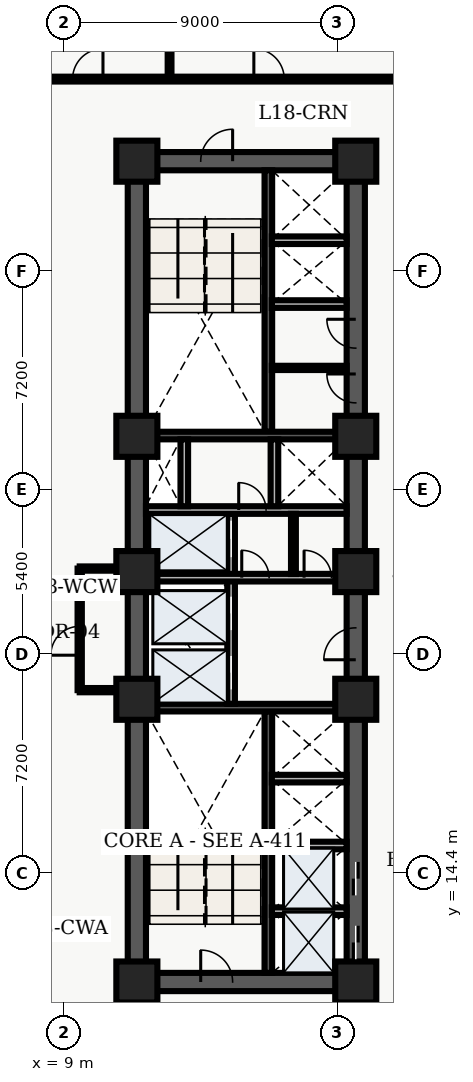
"""IFC4 building model, lengths in metres.
Left out: names, types, materials, properties, quantities, classifications, styles, units other than length and angle.
Written with IfcOpenShell. Run it as: python <this file> out.ifc"""

import sys

from ifc_helpers import new_model, entity, si_unit, converted_unit, direction, frame, origin_with_axes, origin_2d_with_axis, place, context, subcontext, project, spatial, polyline, rectangle, outline, extrude, element, fill, save


model = new_model("IFC4")
c1 = context("Model", 3, precision=1e-05, world=origin_with_axes(), true_north=direction((0.0, 1.0)))
c2 = subcontext(c1, "Body", "Model", "MODEL_VIEW")
j1 = project(units=[si_unit("LENGTHUNIT", "METRE"), converted_unit("PLANEANGLEUNIT", "DEGREE", entity("IfcPlaneAngleMeasure", 0.017), si_unit("PLANEANGLEUNIT", "RADIAN"), dimensions=[0, 0, 0, 0, 0, 0, 0])], contexts=[c1])
p1 = place(None, origin_with_axes())
s1 = spatial("IfcSite", under=j1, at=p1, CompositionType="ELEMENT")
p2 = place(p1, origin_with_axes())
s2 = spatial("IfcBuilding", under=s1, at=p2, CompositionType="ELEMENT")
p3 = place(p2, frame((0.0, 0.0, 75.6), z_axis=(0.0, 0.0, 1.0), x_axis=(1.0, 0.0, 0.0)))
s3 = spatial("IfcBuildingStorey", under=s2, at=p3, CompositionType="ELEMENT", Elevation=75.6)
p4 = place(p3, frame((11.4, 10.8, 0.0), z_axis=(0.0, 0.0, 1.0), x_axis=(0.0, 1.0, 0.0)))
e1 = element("IfcWall", 1, at=p4, inside=s3, PredefinedType="SHEAR", context=c2, shape_type="SweptSolid", body=[
    extrude(outline(polyline([(0.0, -0.3), (27.0, -0.3), (27.0, 0.3), (0.0, 0.3), (0.0, -0.3)])), origin_with_axes(), (0.0, 0.0, 1.0), 3.6),
])
p5 = place(p3, frame((11.4, 10.8, 0.0), z_axis=(0.0, 0.0, 1.0), x_axis=(1.0, 0.0, 0.0)))
e2 = element("IfcWall", 2, at=p5, inside=s3, PredefinedType="SHEAR", context=c2, shape_type="SweptSolid", body=[
    extrude(outline(polyline([(0.0, -0.3), (7.2, -0.3), (7.2, 0.3), (0.0, 0.3), (0.0, -0.3)])), origin_with_axes(), (0.0, 0.0, 1.0), 3.6),
])
p6 = place(p5, frame((2.625, 0.0, 0.0), z_axis=(0.0, 0.0, 1.0), x_axis=(1.0, 0.0, 0.0)))
e3 = element("IfcOpeningElement", 3, at=p6, cuts=e2, PredefinedType="OPENING", context=c2, shape_type="SweptSolid", body=[
    extrude(rectangle(XDim=1.05, YDim=0.62, at=origin_2d_with_axis()), origin_with_axes(), (0.0, 0.0, 1.0), 2.15),
])
p7 = place(p3, frame((11.4, 37.8, 0.0), z_axis=(0.0, 0.0, 1.0), x_axis=(1.0, 0.0, 0.0)))
e4 = element("IfcWall", 4, at=p7, inside=s3, PredefinedType="SHEAR", context=c2, shape_type="SweptSolid", body=[
    extrude(outline(polyline([(0.0, -0.3), (7.2, -0.3), (7.2, 0.3), (0.0, 0.3), (0.0, -0.3)])), origin_with_axes(), (0.0, 0.0, 1.0), 3.6),
])
p8 = place(p7, frame((2.625, 0.0, 0.0), z_axis=(0.0, 0.0, 1.0), x_axis=(1.0, 0.0, 0.0)))
e5 = element("IfcOpeningElement", 5, at=p8, cuts=e4, PredefinedType="OPENING", context=c2, shape_type="SweptSolid", body=[
    extrude(rectangle(XDim=1.05, YDim=0.62, at=origin_2d_with_axis()), origin_with_axes(), (0.0, 0.0, 1.0), 2.15),
])
p9 = place(p3, frame((18.6, 10.8, 0.0), z_axis=(0.0, 0.0, 1.0), x_axis=(0.0, 1.0, 0.0)))
e6 = element("IfcWall", 6, at=p9, inside=s3, PredefinedType="SHEAR", context=c2, shape_type="SweptSolid", body=[
    extrude(outline(polyline([(0.0, -0.3), (13.5, -0.3), (13.5, 0.3), (0.0, 0.3), (0.0, -0.3)])), origin_with_axes(), (0.0, 0.0, 1.0), 3.6),
])
p10 = place(p9, frame((1.3, 0.0, 0.0), z_axis=(0.0, 0.0, 1.0), x_axis=(1.0, 0.0, 0.0)))
e7 = element("IfcOpeningElement", 7, at=p10, cuts=e6, PredefinedType="OPENING", context=c2, shape_type="SweptSolid", body=[
    extrude(rectangle(XDim=1.1, YDim=0.62, at=origin_2d_with_axis()), origin_with_axes(), (0.0, 0.0, 1.0), 2.15),
])
p11 = place(p9, frame((3.4, 0.0, 0.0), z_axis=(0.0, 0.0, 1.0), x_axis=(1.0, 0.0, 0.0)))
e8 = element("IfcOpeningElement", 8, at=p11, cuts=e6, PredefinedType="OPENING", context=c2, shape_type="SweptSolid", body=[
    extrude(rectangle(XDim=1.1, YDim=0.62, at=origin_2d_with_axis()), origin_with_axes(), (0.0, 0.0, 1.0), 2.15),
])
p12 = place(p9, frame((11.125, 0.0, 0.0), z_axis=(0.0, 0.0, 1.0), x_axis=(1.0, 0.0, 0.0)))
e9 = element("IfcOpeningElement", 9, at=p12, cuts=e6, PredefinedType="OPENING", context=c2, shape_type="SweptSolid", body=[
    extrude(rectangle(XDim=1.05, YDim=0.62, at=origin_2d_with_axis()), origin_with_axes(), (0.0, 0.0, 1.0), 2.15),
])
p13 = place(p3, frame((18.6, 24.3, 0.0), z_axis=(0.0, 0.0, 1.0), x_axis=(0.0, 1.0, 0.0)))
e10 = element("IfcWall", 10, at=p13, inside=s3, PredefinedType="SHEAR", context=c2, shape_type="SweptSolid", body=[
    extrude(outline(polyline([(0.0, -0.3), (13.5, -0.3), (13.5, 0.3), (0.0, 0.3), (0.0, -0.3)])), origin_with_axes(), (0.0, 0.0, 1.0), 3.6),
])
p14 = place(p13, frame((6.025, 0.0, 0.0), z_axis=(0.0, 0.0, 1.0), x_axis=(1.0, 0.0, 0.0)))
e11 = element("IfcOpeningElement", 11, at=p14, cuts=e10, PredefinedType="OPENING", context=c2, shape_type="SweptSolid", body=[
    extrude(rectangle(XDim=0.95, YDim=0.62, at=origin_2d_with_axis()), origin_with_axes(), (0.0, 0.0, 1.0), 2.15),
])
p15 = place(p13, frame((7.825, 0.0, 0.0), z_axis=(0.0, 0.0, 1.0), x_axis=(1.0, 0.0, 0.0)))
e12 = element("IfcOpeningElement", 12, at=p15, cuts=e10, PredefinedType="OPENING", context=c2, shape_type="SweptSolid", body=[
    extrude(rectangle(XDim=0.95, YDim=0.62, at=origin_2d_with_axis()), origin_with_axes(), (0.0, 0.0, 1.0), 2.15),
])
p16 = place(p3, frame((15.725, 11.1, 0.0), z_axis=(0.0, 0.0, 1.0), x_axis=(0.0, 1.0, 0.0)))
e13 = element("IfcWall", 13, at=p16, inside=s3, PredefinedType="SHEAR", context=c2, shape_type="SweptSolid", body=[
    extrude(outline(polyline([(0.0, -0.125), (8.6, -0.125), (8.6, 0.125), (0.0, 0.125), (0.0, -0.125)])), origin_with_axes(), (0.0, 0.0, 1.0), 3.6),
])
p17 = place(p3, frame((11.7, 19.825, 0.0), z_axis=(0.0, 0.0, 1.0), x_axis=(1.0, 0.0, 0.0)))
e14 = element("IfcWall", 14, at=p17, inside=s3, PredefinedType="SHEAR", context=c2, shape_type="SweptSolid", body=[
    extrude(outline(polyline([(0.0, -0.125), (6.6, -0.125), (6.6, 0.125), (0.0, 0.125), (0.0, -0.125)])), origin_with_axes(), (0.0, 0.0, 1.0), 3.6),
])
p18 = place(p3, frame((15.725, 28.9, 0.0), z_axis=(0.0, 0.0, 1.0), x_axis=(0.0, 1.0, 0.0)))
e15 = element("IfcWall", 15, at=p18, inside=s3, PredefinedType="SHEAR", context=c2, shape_type="SweptSolid", body=[
    extrude(outline(polyline([(0.0, -0.125), (8.6, -0.125), (8.6, 0.125), (0.0, 0.125), (0.0, -0.125)])), origin_with_axes(), (0.0, 0.0, 1.0), 3.6),
])
p19 = place(p3, frame((11.7, 28.775, 0.0), z_axis=(0.0, 0.0, 1.0), x_axis=(1.0, 0.0, 0.0)))
e16 = element("IfcWall", 16, at=p19, inside=s3, PredefinedType="SHEAR", context=c2, shape_type="SweptSolid", body=[
    extrude(outline(polyline([(0.0, -0.125), (6.6, -0.125), (6.6, 0.125), (0.0, 0.125), (0.0, -0.125)])), origin_with_axes(), (0.0, 0.0, 1.0), 3.6),
])
p20 = place(p3, frame((14.5, 19.95, 0.0), z_axis=(0.0, 0.0, 1.0), x_axis=(0.0, 1.0, 0.0)))
e17 = element("IfcWall", 17, at=p20, inside=s3, PredefinedType="SOLIDWALL", context=c2, shape_type="SweptSolid", body=[
    extrude(outline(polyline([(0.0, -0.125), (6.25, -0.125), (6.25, 0.125), (0.0, 0.125), (0.0, -0.125)])), origin_with_axes(), (0.0, 0.0, 1.0), 2.64),
])
p21 = place(p20, frame((1.025, 0.0, 0.0), z_axis=(0.0, 0.0, 1.0), x_axis=(1.0, 0.0, 0.0)))
e18 = element("IfcOpeningElement", 18, at=p21, cuts=e17, PredefinedType="OPENING", context=c2, shape_type="SweptSolid", body=[
    extrude(rectangle(XDim=1.1, YDim=0.27, at=origin_2d_with_axis()), origin_with_axes(), (0.0, 0.0, 1.0), 2.15),
])
p22 = place(p20, frame((2.975, 0.0, 0.0), z_axis=(0.0, 0.0, 1.0), x_axis=(1.0, 0.0, 0.0)))
e19 = element("IfcOpeningElement", 19, at=p22, cuts=e17, PredefinedType="OPENING", context=c2, shape_type="SweptSolid", body=[
    extrude(rectangle(XDim=1.1, YDim=0.27, at=origin_2d_with_axis()), origin_with_axes(), (0.0, 0.0, 1.0), 2.15),
])
p23 = place(p20, frame((5.425, 0.0, 0.0), z_axis=(0.0, 0.0, 1.0), x_axis=(1.0, 0.0, 0.0)))
e20 = element("IfcOpeningElement", 20, at=p23, cuts=e17, PredefinedType="OPENING", context=c2, shape_type="SweptSolid", body=[
    extrude(rectangle(XDim=1.2, YDim=0.27, at=origin_2d_with_axis()), origin_with_axes(), (0.0, 0.0, 1.0), 2.15),
])
p24 = place(p3, frame((11.7, 24.1, 0.0), z_axis=(0.0, 0.0, 1.0), x_axis=(1.0, 0.0, 0.0)))
e21 = element("IfcWall", 21, at=p24, inside=s3, PredefinedType="SOLIDWALL", context=c2, shape_type="SweptSolid", body=[
    extrude(outline(polyline([(0.0, -0.125), (6.6, -0.125), (6.6, 0.125), (0.0, 0.125), (0.0, -0.125)])), origin_with_axes(), (0.0, 0.0, 1.0), 2.64),
])
p25 = place(p24, frame((3.6, 0.0, 0.0), z_axis=(0.0, 0.0, 1.0), x_axis=(1.0, 0.0, 0.0)))
e22 = element("IfcOpeningElement", 22, at=p25, cuts=e21, PredefinedType="OPENING", context=c2, shape_type="SweptSolid", body=[
    extrude(rectangle(XDim=0.9, YDim=0.27, at=origin_2d_with_axis()), origin_with_axes(), (0.0, 0.0, 1.0), 2.15),
])
p26 = place(p24, frame((5.65, 0.0, 0.0), z_axis=(0.0, 0.0, 1.0), x_axis=(1.0, 0.0, 0.0)))
e23 = element("IfcOpeningElement", 23, at=p26, cuts=e21, PredefinedType="OPENING", context=c2, shape_type="SweptSolid", body=[
    extrude(rectangle(XDim=0.9, YDim=0.27, at=origin_2d_with_axis()), origin_with_axes(), (0.0, 0.0, 1.0), 2.15),
])
p27 = place(p3, frame((11.7, 26.325, 0.0), z_axis=(0.0, 0.0, 1.0), x_axis=(1.0, 0.0, 0.0)))
e24 = element("IfcWall", 24, at=p27, inside=s3, PredefinedType="SOLIDWALL", context=c2, shape_type="SweptSolid", body=[
    extrude(outline(polyline([(0.0, -0.125), (6.6, -0.125), (6.6, 0.125), (0.0, 0.125), (0.0, -0.125)])), origin_with_axes(), (0.0, 0.0, 1.0), 2.64),
])
p28 = place(p27, frame((3.5, 0.0, 0.0), z_axis=(0.0, 0.0, 1.0), x_axis=(1.0, 0.0, 0.0)))
e25 = element("IfcOpeningElement", 25, at=p28, cuts=e24, PredefinedType="OPENING", context=c2, shape_type="SweptSolid", body=[
    extrude(rectangle(XDim=0.9, YDim=0.27, at=origin_2d_with_axis()), origin_with_axes(), (0.0, 0.0, 1.0), 2.15),
])
for number, where, z_axis, x_axis in (
    (26, (12.96, 26.45, 0.0), (0.0, 0.0, 1.0), (0.0, 1.0, 0.0)),
    (27, (15.925, 26.45, 0.0), (0.0, 0.0, 1.0), (0.0, 1.0, 0.0)),
):
    element("IfcWall", number, at=place(p3, frame(where, z_axis=z_axis, x_axis=x_axis)), inside=s3, PredefinedType="SOLIDWALL", context=c2, shape_type="SweptSolid", body=[
        extrude(outline(polyline([(0.0, -0.125), (2.2, -0.125), (2.2, 0.125), (0.0, 0.125), (0.0, -0.125)])), origin_with_axes(), (0.0, 0.0, 1.0), 2.64),
    ])
for number, where, z_axis, x_axis in (
    (28, (11.4, 10.8, 0.0), (0.0, 0.0, 1.0), (1.0, 0.0, 0.0)),
    (29, (11.4, 20.1, 0.0), (0.0, 0.0, 1.0), (1.0, 0.0, 0.0)),
    (30, (11.4, 24.3, 0.0), (0.0, 0.0, 1.0), (1.0, 0.0, 0.0)),
    (31, (11.4, 28.75, 0.0), (0.0, 0.0, 1.0), (1.0, 0.0, 0.0)),
    (32, (11.4, 37.8, 0.0), (0.0, 0.0, 1.0), (1.0, 0.0, 0.0)),
    (33, (18.6, 10.8, 0.0), (0.0, 0.0, 1.0), (1.0, 0.0, 0.0)),
    (34, (18.6, 20.1, 0.0), (0.0, 0.0, 1.0), (1.0, 0.0, 0.0)),
    (35, (18.6, 24.3, 0.0), (0.0, 0.0, 1.0), (1.0, 0.0, 0.0)),
    (36, (18.6, 28.75, 0.0), (0.0, 0.0, 1.0), (1.0, 0.0, 0.0)),
    (37, (18.6, 37.8, 0.0), (0.0, 0.0, 1.0), (1.0, 0.0, 0.0)),
):
    element("IfcColumn", number, at=place(p3, frame(where, z_axis=z_axis, x_axis=x_axis)), inside=s3, PredefinedType="COLUMN", context=c2, shape_type="SweptSolid", body=[
        extrude(rectangle(XDim=1.35, YDim=1.35, at=origin_2d_with_axis()), origin_with_axes(), (0.0, 0.0, 1.0), 3.9),
    ])
p29 = place(p3, frame((16.55, 24.22, 0.0), z_axis=(0.0, 0.0, 1.0), x_axis=(0.0, 1.0, 0.0)))
e38 = element("IfcWall", 38, at=p29, inside=s3, PredefinedType="PARTITIONING", context=c2, shape_type="SweptSolid", body=[
    extrude(outline(polyline([(0.0, -0.08), (1.98, -0.08), (1.98, 0.08), (0.0, 0.08), (0.0, -0.08)])), origin_with_axes(), (0.0, 0.0, 1.0), 2.64),
])
for number, where, z_axis, x_axis in (
    (39, (15.84, 13.13, 0.0), (0.0, 0.0, 1.0), (1.0, 0.0, 0.0)),
    (40, (15.84, 15.29, 0.0), (0.0, 0.0, 1.0), (1.0, 0.0, 0.0)),
    (41, (15.84, 17.49, 0.0), (0.0, 0.0, 1.0), (1.0, 0.0, 0.0)),
    (42, (15.84, 33.1, 0.0), (0.0, 0.0, 1.0), (1.0, 0.0, 0.0)),
    (43, (15.84, 35.2, 0.0), (0.0, 0.0, 1.0), (1.0, 0.0, 0.0)),
):
    element("IfcWall", number, at=place(p3, frame(where, z_axis=z_axis, x_axis=x_axis)), inside=s3, PredefinedType="SOLIDWALL", context=c2, shape_type="SweptSolid", body=[
        extrude(outline(polyline([(0.0, -0.125), (2.46, -0.125), (2.46, 0.125), (0.0, 0.125), (0.0, -0.125)])), origin_with_axes(), (0.0, 0.0, 1.0), 2.64),
    ])
p30 = place(p3, frame((15.84, 31.0, 0.0), z_axis=(0.0, 0.0, 1.0), x_axis=(1.0, 0.0, 0.0)))
e44 = element("IfcWall", 44, at=p30, inside=s3, PredefinedType="PARTITIONING", context=c2, shape_type="SweptSolid", body=[
    extrude(outline(polyline([(0.0, -0.07), (2.46, -0.07), (2.46, 0.07), (0.0, 0.07), (0.0, -0.07)])), origin_with_axes(), (0.0, 0.0, 1.0), 2.64),
])
p31 = place(p3, frame((9.52, 20.4, 0.0), z_axis=(0.0, 0.0, 1.0), x_axis=(0.0, 1.0, 0.0)))
e45 = element("IfcWall", 45, at=p31, inside=s3, PredefinedType="PARTITIONING", context=c2, shape_type="SweptSolid", body=[
    extrude(outline(polyline([(0.0, -0.07), (4.0, -0.07), (4.0, 0.07), (0.0, 0.07), (0.0, -0.07)])), origin_with_axes(), (0.0, 0.0, 1.0), 2.64),
])
p32 = place(p31, frame((1.625, 0.0, 0.0), z_axis=(0.0, 0.0, 1.0), x_axis=(1.0, 0.0, 0.0)))
e46 = element("IfcOpeningElement", 46, at=p32, cuts=e45, PredefinedType="OPENING", context=c2, shape_type="SweptSolid", body=[
    extrude(rectangle(XDim=0.95, YDim=0.16, at=origin_2d_with_axis()), origin_with_axes(), (0.0, 0.0, 1.0), 2.15),
])
for number, where, z_axis, x_axis in (
    (47, (9.52, 20.4, 0.0), (0.0, 0.0, 1.0), (1.0, 0.0, 0.0)),
    (48, (9.52, 24.4, 0.0), (0.0, 0.0, 1.0), (1.0, 0.0, 0.0)),
):
    element("IfcWall", number, at=place(p3, frame(where, z_axis=z_axis, x_axis=x_axis)), inside=s3, PredefinedType="PARTITIONING", context=c2, shape_type="SweptSolid", body=[
        extrude(outline(polyline([(0.0, -0.07), (1.58, -0.07), (1.58, 0.07), (0.0, 0.07), (0.0, -0.07)])), origin_with_axes(), (0.0, 0.0, 1.0), 2.64),
    ])
p33 = place(p3, frame((2.6, 40.5, 0.0), z_axis=(0.0, 0.0, 1.0), x_axis=(1.0, 0.0, 0.0)))
e49 = element("IfcWall", 49, at=p33, inside=s3, PredefinedType="PARTITIONING", context=c2, shape_type="SweptSolid", body=[
    extrude(outline(polyline([(0.0, -0.08), (18.65, -0.08), (18.65, 0.08), (0.0, 0.08), (0.0, -0.08)])), origin_with_axes(), (0.0, 0.0, 1.0), 2.64),
])
p34 = place(p33, frame((0.992, 0.0, 0.0), z_axis=(0.0, 0.0, 1.0), x_axis=(1.0, 0.0, 0.0)))
e50 = element("IfcOpeningElement", 50, at=p34, cuts=e49, PredefinedType="OPENING", context=c2, shape_type="SweptSolid", body=[
    extrude(rectangle(XDim=1.0, YDim=0.18, at=origin_2d_with_axis()), origin_with_axes(), (0.0, 0.0, 1.0), 2.15),
])
p35 = place(p33, frame((7.186, 0.0, 0.0), z_axis=(0.0, 0.0, 1.0), x_axis=(1.0, 0.0, 0.0)))
e51 = element("IfcOpeningElement", 51, at=p35, cuts=e49, PredefinedType="OPENING", context=c2, shape_type="SweptSolid", body=[
    extrude(rectangle(XDim=1.0, YDim=0.18, at=origin_2d_with_axis()), origin_with_axes(), (0.0, 0.0, 1.0), 2.15),
])
p36 = place(p33, frame((13.148, 0.0, 0.0), z_axis=(0.0, 0.0, 1.0), x_axis=(1.0, 0.0, 0.0)))
e52 = element("IfcOpeningElement", 52, at=p36, cuts=e49, PredefinedType="OPENING", context=c2, shape_type="SweptSolid", body=[
    extrude(rectangle(XDim=1.0, YDim=0.18, at=origin_2d_with_axis()), origin_with_axes(), (0.0, 0.0, 1.0), 2.15),
])
p37 = place(p3, frame((12.476, 40.6, 0.0), z_axis=(0.0, 0.0, 1.0), x_axis=(0.0, 1.0, 0.0)))
e53 = element("IfcWall", 53, at=p37, inside=s3, PredefinedType="PARTITIONING", context=c2, shape_type="SweptSolid", body=[
    extrude(outline(polyline([(0.0, -0.062), (7.64, -0.062), (7.64, 0.062), (0.0, 0.062), (0.0, -0.062)])), origin_with_axes(), (0.0, 0.0, 1.0), 2.64),
])
p38 = place(p9, frame((1.3, 0.0, 0.0), z_axis=(0.0, 0.0, 1.0), x_axis=(1.0, 0.0, 0.0)))
e54 = element("IfcDoor", 54, at=p38, inside=s3, OperationType="SLIDING_TO_LEFT", PredefinedType="DOOR", context=c2, shape_type="SweptSolid", body=[
    extrude(rectangle(XDim=1.1, YDim=0.09, at=origin_2d_with_axis()), origin_with_axes(), (0.0, 0.0, 1.0), 2.15),
])
fill(e7, e54)
p39 = place(p9, frame((3.4, 0.0, 0.0), z_axis=(0.0, 0.0, 1.0), x_axis=(1.0, 0.0, 0.0)))
e55 = element("IfcDoor", 55, at=p39, inside=s3, OperationType="SLIDING_TO_RIGHT", PredefinedType="DOOR", context=c2, shape_type="SweptSolid", body=[
    extrude(rectangle(XDim=1.1, YDim=0.09, at=origin_2d_with_axis()), origin_with_axes(), (0.0, 0.0, 1.0), 2.15),
])
fill(e8, e55)
p40 = place(p20, frame((1.025, 0.0, 0.0), z_axis=(0.0, 0.0, 1.0), x_axis=(1.0, 0.0, 0.0)))
e56 = element("IfcDoor", 56, at=p40, inside=s3, OperationType="SLIDING_TO_LEFT", PredefinedType="DOOR", context=c2, shape_type="SweptSolid", body=[
    extrude(rectangle(XDim=1.1, YDim=0.09, at=origin_2d_with_axis()), origin_with_axes(), (0.0, 0.0, 1.0), 2.15),
])
fill(e18, e56)
p41 = place(p20, frame((2.975, 0.0, 0.0), z_axis=(0.0, 0.0, 1.0), x_axis=(1.0, 0.0, 0.0)))
e57 = element("IfcDoor", 57, at=p41, inside=s3, OperationType="SLIDING_TO_RIGHT", PredefinedType="DOOR", context=c2, shape_type="SweptSolid", body=[
    extrude(rectangle(XDim=1.1, YDim=0.09, at=origin_2d_with_axis()), origin_with_axes(), (0.0, 0.0, 1.0), 2.15),
])
fill(e19, e57)
p42 = place(p20, frame((5.425, 0.0, 0.0), z_axis=(0.0, 0.0, 1.0), x_axis=(1.0, 0.0, 0.0)))
e58 = element("IfcDoor", 58, at=p42, inside=s3, OperationType="DOUBLE_DOOR_SLIDING", PredefinedType="DOOR", context=c2, shape_type="SweptSolid", body=[
    extrude(rectangle(XDim=1.2, YDim=0.09, at=origin_2d_with_axis()), origin_with_axes(), (0.0, 0.0, 1.0), 2.15),
])
fill(e20, e58)
p43 = place(p5, frame((2.625, 0.0, 0.0), z_axis=(0.0, 0.0, 1.0), x_axis=(1.0, 0.0, 0.0)))
e59 = element("IfcDoor", 59, at=p43, inside=s3, OperationType="SINGLE_SWING_LEFT", PredefinedType="DOOR", context=c2, shape_type="SweptSolid", body=[
    extrude(rectangle(XDim=1.05, YDim=0.09, at=origin_2d_with_axis()), origin_with_axes(), (0.0, 0.0, 1.0), 2.15),
])
fill(e3, e59)
p44 = place(p7, frame((2.625, 0.0, 0.0), z_axis=(0.0, 0.0, 1.0), x_axis=(1.0, 0.0, 0.0)))
e60 = element("IfcDoor", 60, at=p44, inside=s3, OperationType="SINGLE_SWING_RIGHT", PredefinedType="DOOR", context=c2, shape_type="SweptSolid", body=[
    extrude(rectangle(XDim=1.05, YDim=0.09, at=origin_2d_with_axis()), origin_with_axes(), (0.0, 0.0, 1.0), 2.15),
])
fill(e5, e60)
p45 = place(p9, frame((11.125, 0.0, 0.0), z_axis=(0.0, 0.0, 1.0), x_axis=(1.0, 0.0, 0.0)))
e61 = element("IfcDoor", 61, at=p45, inside=s3, OperationType="SINGLE_SWING_LEFT", PredefinedType="DOOR", context=c2, shape_type="SweptSolid", body=[
    extrude(rectangle(XDim=1.05, YDim=0.09, at=origin_2d_with_axis()), origin_with_axes(), (0.0, 0.0, 1.0), 2.15),
])
fill(e9, e61)
p46 = place(p24, frame((3.6, 0.0, 0.0), z_axis=(0.0, 0.0, 1.0), x_axis=(1.0, 0.0, 0.0)))
e62 = element("IfcDoor", 62, at=p46, inside=s3, OperationType="SINGLE_SWING_LEFT", PredefinedType="DOOR", context=c2, shape_type="SweptSolid", body=[
    extrude(rectangle(XDim=0.9, YDim=0.09, at=origin_2d_with_axis()), origin_with_axes(), (0.0, 0.0, 1.0), 2.15),
])
fill(e22, e62)
p47 = place(p24, frame((5.65, 0.0, 0.0), z_axis=(0.0, 0.0, 1.0), x_axis=(1.0, 0.0, 0.0)))
e63 = element("IfcDoor", 63, at=p47, inside=s3, OperationType="SINGLE_SWING_LEFT", PredefinedType="DOOR", context=c2, shape_type="SweptSolid", body=[
    extrude(rectangle(XDim=0.9, YDim=0.09, at=origin_2d_with_axis()), origin_with_axes(), (0.0, 0.0, 1.0), 2.15),
])
fill(e23, e63)
p48 = place(p27, frame((3.5, 0.0, 0.0), z_axis=(0.0, 0.0, 1.0), x_axis=(1.0, 0.0, 0.0)))
e64 = element("IfcDoor", 64, at=p48, inside=s3, OperationType="SINGLE_SWING_LEFT", PredefinedType="DOOR", context=c2, shape_type="SweptSolid", body=[
    extrude(rectangle(XDim=0.9, YDim=0.09, at=origin_2d_with_axis()), origin_with_axes(), (0.0, 0.0, 1.0), 2.15),
])
fill(e25, e64)
p49 = place(p13, frame((6.025, 0.0, 0.0), z_axis=(0.0, 0.0, 1.0), x_axis=(1.0, 0.0, 0.0)))
e65 = element("IfcDoor", 65, at=p49, inside=s3, OperationType="SINGLE_SWING_RIGHT", PredefinedType="DOOR", context=c2, shape_type="SweptSolid", body=[
    extrude(rectangle(XDim=0.95, YDim=0.09, at=origin_2d_with_axis()), origin_with_axes(), (0.0, 0.0, 1.0), 2.15),
])
fill(e11, e65)
p50 = place(p13, frame((7.825, 0.0, 0.0), z_axis=(0.0, 0.0, 1.0), x_axis=(1.0, 0.0, 0.0)))
e66 = element("IfcDoor", 66, at=p50, inside=s3, OperationType="SINGLE_SWING_RIGHT", PredefinedType="DOOR", context=c2, shape_type="SweptSolid", body=[
    extrude(rectangle(XDim=0.95, YDim=0.09, at=origin_2d_with_axis()), origin_with_axes(), (0.0, 0.0, 1.0), 2.15),
])
fill(e12, e66)
p51 = place(p31, frame((1.625, 0.0, 0.0), z_axis=(0.0, 0.0, 1.0), x_axis=(1.0, 0.0, 0.0)))
e67 = element("IfcDoor", 67, at=p51, inside=s3, OperationType="SINGLE_SWING_LEFT", PredefinedType="DOOR", context=c2, shape_type="SweptSolid", body=[
    extrude(rectangle(XDim=0.95, YDim=0.084, at=origin_2d_with_axis()), origin_with_axes(), (0.0, 0.0, 1.0), 2.15),
])
fill(e46, e67)
p52 = place(p33, frame((7.186, 0.0, 0.0), z_axis=(0.0, 0.0, 1.0), x_axis=(1.0, 0.0, 0.0)))
e68 = element("IfcDoor", 68, at=p52, inside=s3, OperationType="SINGLE_SWING_RIGHT", PredefinedType="DOOR", context=c2, shape_type="SweptSolid", body=[
    extrude(rectangle(XDim=1.0, YDim=0.09, at=origin_2d_with_axis()), origin_with_axes(), (0.0, 0.0, 1.0), 2.15),
])
fill(e51, e68)
p53 = place(p33, frame((13.148, 0.0, 0.0), z_axis=(0.0, 0.0, 1.0), x_axis=(1.0, 0.0, 0.0)))
e69 = element("IfcDoor", 69, at=p53, inside=s3, OperationType="SINGLE_SWING_LEFT", PredefinedType="DOOR", context=c2, shape_type="SweptSolid", body=[
    extrude(rectangle(XDim=1.0, YDim=0.09, at=origin_2d_with_axis()), origin_with_axes(), (0.0, 0.0, 1.0), 2.15),
])
fill(e52, e69)
save(model, sys.argv[1])
